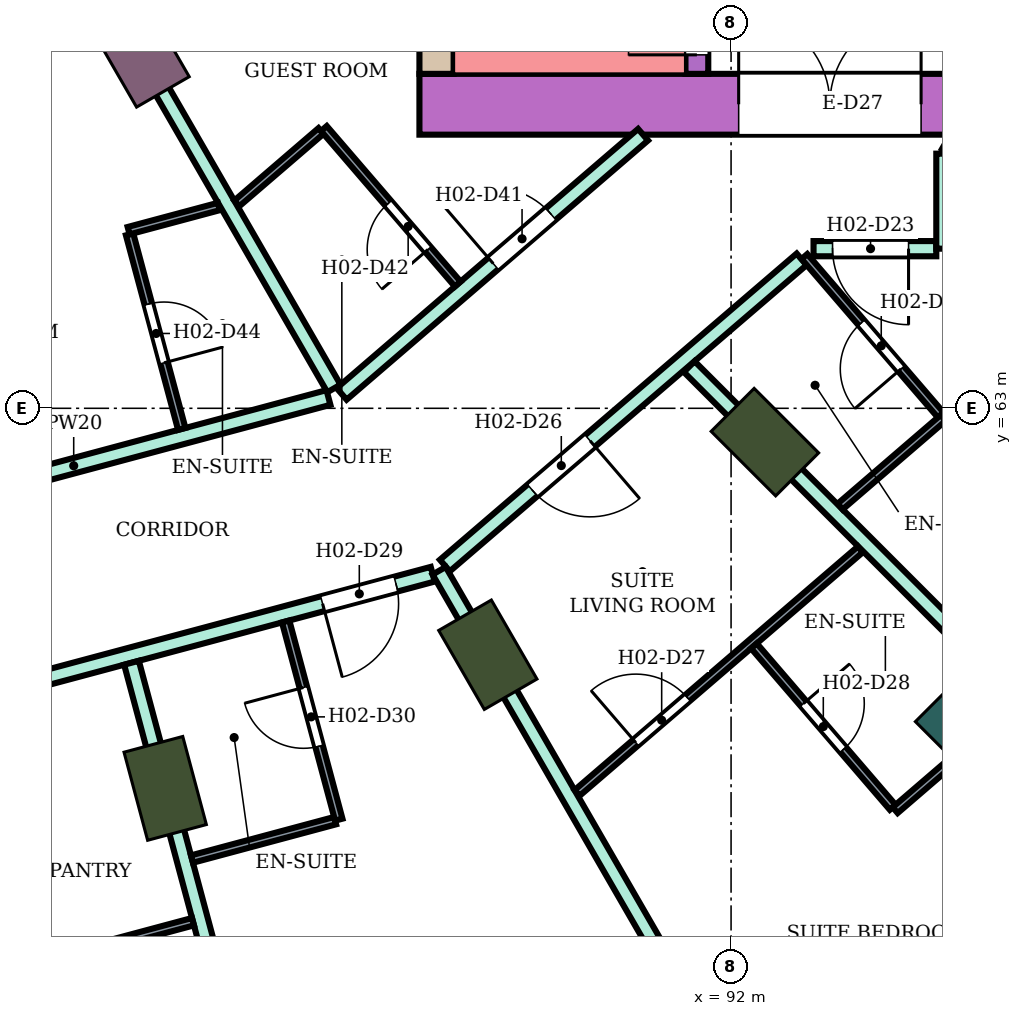
"""IFC4 building model, lengths in metres.
Left out: names, types, materials, properties, quantities, classifications, styles, units other than length and angle.
Written with IfcOpenShell. Run it as: python <this file> out.ifc"""

import sys

from ifc_helpers import new_model, si_unit, direction, frame, frame_2d, origin, origin_2d, place, context, subcontext, project, spatial, rectangle, extrude, element, fill, save


model = new_model("IFC4")
c1 = context("Model", 3, precision=1e-05, world=origin(), true_north=direction((0.0, 1.0)))
c2 = subcontext(c1, "Body", "Model", "MODEL_VIEW")
j1 = project(units=[si_unit("LENGTHUNIT", "METRE"), si_unit("PLANEANGLEUNIT", "RADIAN")], contexts=[c1])
p1 = place(None, origin())
s1 = spatial("IfcSite", under=j1, at=p1, CompositionType="ELEMENT")
p2 = place(p1, origin())
s2 = spatial("IfcBuilding", under=s1, at=p2, CompositionType="ELEMENT")
p3 = place(p2, frame((0.0, 0.0, 40.2)))
s3 = spatial("IfcBuildingStorey", under=s2, at=p3, CompositionType="ELEMENT", Elevation=40.2)
for number, where, z_axis, x_axis in (
    (1, (84.555, 58.0, 0.0), (0.0, 0.0, 1.0), (0.259, -0.966, 0.0)),
    (2, (88.8, 59.758, 0.0), (0.0, 0.0, 1.0), (0.5, -0.866, 0.0)),
    (3, (92.445, 62.555, 0.0), (0.0, 0.0, 1.0), (0.707, -0.707, 0.0)),
):
    element("IfcColumn", number, at=place(p3, frame(where, z_axis=z_axis, x_axis=x_axis)), inside=s3, PredefinedType="COLUMN", context=c2, shape_type="SweptSolid", body=[
        extrude(rectangle(XDim=1.2, YDim=0.8, at=origin_2d()), origin(), (0.0, 0.0, 1.0), 3.8),
    ])
p4 = place(p3, frame((84.3, 67.552, 0.0), z_axis=(0.0, 0.0, 1.0), x_axis=(0.5, -0.866025403784, 0.0)))
e4 = element("IfcColumn", 4, at=p4, inside=s3, PredefinedType="COLUMN", context=c2, shape_type="SweptSolid", body=[
    extrude(rectangle(XDim=0.9, YDim=0.8, at=origin_2d()), origin(), (0.0, 0.0, 1.0), 3.8),
])
p5 = place(p3, frame((95.91, 59.09, 0.0), z_axis=(0.0, 0.0, 1.0), x_axis=(0.707106781187, -0.707106781187, 0.0)))
e5 = element("IfcColumn", 5, at=p5, inside=s3, PredefinedType="COLUMN", context=c2, shape_type="SweptSolid", body=[
    extrude(rectangle(XDim=1.8, YDim=2.4, at=origin_2d()), origin(), (0.0, 0.0, 1.0), 3.8),
])
p6 = place(p3, frame((87.9, 67.0, 0.0), z_axis=(0.0, 0.0, 1.0), x_axis=(1.0, 0.0, 0.0)))
e6 = element("IfcWall", 6, at=p6, inside=s3, PredefinedType="SHEAR", context=c2, shape_type="SweptSolid", body=[
    extrude(rectangle(XDim=14.7, YDim=0.8, at=frame_2d((7.35, 0.0))), origin(), (0.0, 0.0, 1.0), 3.48),
])
p7 = place(p6, frame((4.2, 0.0, 0.0)))
e7 = element("IfcOpeningElement", 7, at=p7, cuts=e6, PredefinedType="OPENING", context=c2, shape_type="SweptSolid", body=[
    extrude(rectangle(XDim=2.4, YDim=2.4, at=frame_2d((1.2, 1.2))), frame((0.0, 0.41, 0.0), z_axis=(0.0, -1.0, 0.0), x_axis=(1.0, 0.0, 0.0)), (0.0, 0.0, 1.0), 0.82),
])
p8 = place(p3, frame((88.125, 67.4, 0.0), z_axis=(0.0, 0.0, 1.0), x_axis=(0.0, 1.0, 0.0)))
e8 = element("IfcWall", 8, at=p8, inside=s3, PredefinedType="SHEAR", context=c2, shape_type="SweptSolid", body=[
    extrude(rectangle(XDim=7.6, YDim=0.45, at=frame_2d((3.8, 0.0))), origin(), (0.0, 0.0, 1.0), 3.48),
])
p9 = place(p3, frame((91.55, 67.4, 0.0), z_axis=(0.0, 0.0, 1.0), x_axis=(0.0, 1.0, 0.0)))
e9 = element("IfcWall", 9, at=p9, inside=s3, PredefinedType="SHEAR", context=c2, shape_type="SweptSolid", body=[
    extrude(rectangle(XDim=7.6, YDim=0.3, at=frame_2d((3.8, 0.0))), origin(), (0.0, 0.0, 1.0), 3.48),
])
p10 = place(p9, frame((0.25, 0.0, 0.0)))
e10 = element("IfcOpeningElement", 10, at=p10, cuts=e9, PredefinedType="OPENING", context=c2, shape_type="SweptSolid", body=[
    extrude(rectangle(XDim=0.9, YDim=2.1, at=frame_2d((0.45, 1.05))), frame((0.0, 0.16, 0.0), z_axis=(0.0, -1.0, 0.0), x_axis=(1.0, 0.0, 0.0)), (0.0, 0.0, 1.0), 0.32),
])
p11 = place(p3, frame((80.0, 67.396, 0.0), z_axis=(0.0, 0.0, 1.0), x_axis=(0.965933654434, 0.258789828301, 0.0)))
e11 = element("IfcWall", 11, at=p11, inside=s3, PredefinedType="NOTDEFINED", context=c2, shape_type="SweptSolid", body=[
    extrude(rectangle(XDim=3.936, YDim=0.2, at=frame_2d((1.968, 0.0))), origin(), (0.0, 0.0, 1.0), 3.8),
])
p12 = place(p11, frame((0.468, 0.0, 0.9)))
e12 = element("IfcOpeningElement", 12, at=p12, cuts=e11, PredefinedType="OPENING", context=c2, shape_type="SweptSolid", body=[
    extrude(rectangle(XDim=3.0, YDim=2.3, at=frame_2d((1.5, 1.15))), frame((0.0, 0.11, 0.0), z_axis=(0.0, -1.0, 0.0), x_axis=(1.0, 0.0, 0.0)), (0.0, 0.0, 1.0), 0.22),
])
p13 = place(p3, frame((80.0, 58.655, 0.0), z_axis=(0.0, 0.0, 1.0), x_axis=(0.965967338894, 0.258664068224, 0.0)))
e13 = element("IfcWall", 13, at=p13, inside=s3, PredefinedType="PARTITIONING", context=c2, shape_type="SweptSolid", body=[
    extrude(rectangle(XDim=8.36, YDim=0.2, at=frame_2d((4.18, 0.0))), origin(), (0.0, 0.0, 1.0), 3.35),
])
p14 = place(p13, frame((6.86, 0.0, 0.0)))
e14 = element("IfcOpeningElement", 14, at=p14, cuts=e13, PredefinedType="OPENING", context=c2, shape_type="SweptSolid", body=[
    extrude(rectangle(XDim=1.0, YDim=2.1, at=frame_2d((0.5, 1.05))), frame((0.0, 0.11, 0.0), z_axis=(0.0, -1.0, 0.0), x_axis=(1.0, 0.0, 0.0)), (0.0, 0.0, 1.0), 0.22),
])
p15 = place(p13, frame((1.675, 0.0, 0.0)))
e15 = element("IfcOpeningElement", 15, at=p15, cuts=e13, PredefinedType="OPENING", context=c2, shape_type="SweptSolid", body=[
    extrude(rectangle(XDim=0.9, YDim=2.1, at=frame_2d((0.45, 1.05))), frame((0.0, 0.11, 0.0), z_axis=(0.0, -1.0, 0.0), x_axis=(1.0, 0.0, 0.0)), (0.0, 0.0, 1.0), 0.22),
])
p16 = place(p3, frame((80.0, 61.346, 0.0), z_axis=(0.0, 0.0, 1.0), x_axis=(0.965924181808, 0.258825182312, 0.0)))
e16 = element("IfcWall", 16, at=p16, inside=s3, PredefinedType="PARTITIONING", context=c2, shape_type="SweptSolid", body=[
    extrude(rectangle(XDim=6.94, YDim=0.2, at=frame_2d((3.47, 0.0))), origin(), (0.0, 0.0, 1.0), 3.35),
])
p17 = place(p16, frame((0.55, 0.0, 0.0)))
e17 = element("IfcOpeningElement", 17, at=p17, cuts=e16, PredefinedType="OPENING", context=c2, shape_type="SweptSolid", body=[
    extrude(rectangle(XDim=1.0, YDim=2.1, at=frame_2d((0.5, 1.05))), frame((0.0, 0.11, 0.0), z_axis=(0.0, -1.0, 0.0), x_axis=(1.0, 0.0, 0.0)), (0.0, 0.0, 1.0), 0.22),
])
p18 = place(p3, frame((83.848, 68.332, 0.0), z_axis=(0.0, 0.0, 1.0), x_axis=(0.499919778085, -0.866071714975, 0.0)))
e18 = element("IfcWall", 18, at=p18, inside=s3, PredefinedType="PARTITIONING", context=c2, shape_type="SweptSolid", body=[
    extrude(rectangle(XDim=5.855, YDim=0.2, at=frame_2d((2.927, 0.0))), origin(), (0.0, 0.0, 1.0), 3.35),
])
p19 = place(p3, frame((84.112, 59.652, 0.0), z_axis=(0.0, 0.0, 1.0), x_axis=(0.258791091927, -0.965933315886, 0.0)))
e19 = element("IfcWall", 19, at=p19, inside=s3, PredefinedType="PARTITIONING", context=c2, shape_type="SweptSolid", body=[
    extrude(rectangle(XDim=9.909, YDim=0.2, at=frame_2d((4.955, 0.0))), origin(), (0.0, 0.0, 1.0), 3.35),
])
p20 = place(p3, frame((86.877, 63.189, 0.0), z_axis=(0.0, 0.0, 1.0), x_axis=(0.758164888471, 0.652062881853, 0.0)))
e20 = element("IfcWall", 20, at=p20, inside=s3, PredefinedType="PARTITIONING", context=c2, shape_type="SweptSolid", body=[
    extrude(rectangle(XDim=5.23, YDim=0.2, at=frame_2d((2.615, 0.0))), origin(), (0.0, 0.0, 1.0), 3.35),
])
p21 = place(p20, frame((2.63, 0.0, 0.0)))
e21 = element("IfcOpeningElement", 21, at=p21, cuts=e20, PredefinedType="OPENING", context=c2, shape_type="SweptSolid", body=[
    extrude(rectangle(XDim=1.0, YDim=2.1, at=frame_2d((0.5, 1.05))), frame((0.0, 0.11, 0.0), z_axis=(0.0, -1.0, 0.0), x_axis=(1.0, 0.0, 0.0)), (0.0, 0.0, 1.0), 0.22),
])
p22 = place(p3, frame((88.235, 60.931, 0.0), z_axis=(0.0, 0.0, 1.0), x_axis=(0.758799498714, 0.651324282329, 0.0)))
e22 = element("IfcWall", 22, at=p22, inside=s3, PredefinedType="PARTITIONING", context=c2, shape_type="SweptSolid", body=[
    extrude(rectangle(XDim=6.186, YDim=0.2, at=frame_2d((3.093, 0.0))), origin(), (0.0, 0.0, 1.0), 3.35),
])
p23 = place(p22, frame((1.519, 0.0, 0.0)))
e23 = element("IfcOpeningElement", 23, at=p23, cuts=e22, PredefinedType="OPENING", context=c2, shape_type="SweptSolid", body=[
    extrude(rectangle(XDim=1.0, YDim=2.1, at=frame_2d((0.5, 1.05))), frame((0.0, 0.11, 0.0), z_axis=(0.0, -1.0, 0.0), x_axis=(1.0, 0.0, 0.0)), (0.0, 0.0, 1.0), 0.22),
])
p24 = place(p3, frame((88.159, 60.863, 0.0), z_axis=(0.0, 0.0, 1.0), x_axis=(0.499897184548, -0.866084756177, 0.0)))
e24 = element("IfcWall", 24, at=p24, inside=s3, PredefinedType="PARTITIONING", context=c2, shape_type="SweptSolid", body=[
    extrude(rectangle(XDim=9.475, YDim=0.2, at=frame_2d((4.737, 0.0))), origin(), (0.0, 0.0, 1.0), 3.35),
])
p25 = place(p3, frame((91.449, 63.548, 0.0), z_axis=(0.0, 0.0, 1.0), x_axis=(0.706984810649, -0.707228730688, 0.0)))
e25 = element("IfcWall", 25, at=p25, inside=s3, PredefinedType="PARTITIONING", context=c2, shape_type="SweptSolid", body=[
    extrude(rectangle(XDim=7.006, YDim=0.2, at=frame_2d((3.503, 0.0))), origin(), (0.0, 0.0, 1.0), 3.35),
])
p26 = place(p3, frame((93.085, 65.1, 0.0), z_axis=(0.0, 0.0, 1.0), x_axis=(1.0, 0.0, 0.0)))
e26 = element("IfcWall", 26, at=p26, inside=s3, PredefinedType="PARTITIONING", context=c2, shape_type="SweptSolid", body=[
    extrude(rectangle(XDim=1.615, YDim=0.2, at=frame_2d((0.808, 0.0))), origin(), (0.0, 0.0, 1.0), 3.35),
])
p27 = place(p26, frame((0.25, 0.0, 0.0)))
e27 = element("IfcOpeningElement", 27, at=p27, cuts=e26, PredefinedType="OPENING", context=c2, shape_type="SweptSolid", body=[
    extrude(rectangle(XDim=1.0, YDim=2.1, at=frame_2d((0.5, 1.05))), frame((0.0, 0.11, 0.0), z_axis=(0.0, -1.0, 0.0), x_axis=(1.0, 0.0, 0.0)), (0.0, 0.0, 1.0), 0.22),
])
p28 = place(p3, frame((94.8, 65.1, 0.0), z_axis=(0.0, 0.0, 1.0), x_axis=(0.0, 1.0, 0.0)))
e28 = element("IfcWall", 28, at=p28, inside=s3, PredefinedType="PARTITIONING", context=c2, shape_type="SweptSolid", body=[
    extrude(rectangle(XDim=1.25, YDim=0.2, at=frame_2d((0.625, 0.0))), origin(), (0.0, 0.0, 1.0), 3.35),
])
p29 = place(p3, frame((80.106, 54.956, 0.0), z_axis=(0.0, 0.0, 1.0), x_axis=(0.965910666284, 0.258875616386, 0.0)))
e29 = element("IfcWall", 29, at=p29, inside=s3, PredefinedType="PARTITIONING", context=c2, shape_type="SweptSolid", body=[
    extrude(rectangle(XDim=4.985, YDim=0.1, at=frame_2d((2.493, 0.0))), origin(), (0.0, 0.0, 1.0), 3.35),
])
p30 = place(p29, frame((2.038, 0.0, 0.0)))
e30 = element("IfcOpeningElement", 30, at=p30, cuts=e29, PredefinedType="OPENING", context=c2, shape_type="SweptSolid", body=[
    extrude(rectangle(XDim=0.9, YDim=2.1, at=frame_2d((0.45, 1.05))), frame((0.0, 0.06, 0.0), z_axis=(0.0, -1.0, 0.0), x_axis=(1.0, 0.0, 0.0)), (0.0, 0.0, 1.0), 0.12),
])
p31 = place(p3, frame((84.087, 65.289, 0.0), z_axis=(0.0, 0.0, 1.0), x_axis=(0.258929459649, -0.965896234037, 0.0)))
e31 = element("IfcWall", 31, at=p31, inside=s3, PredefinedType="PARTITIONING", context=c2, shape_type="SweptSolid", body=[
    extrude(rectangle(XDim=2.65, YDim=0.1, at=frame_2d((1.325, 0.0))), origin(), (0.0, 0.0, 1.0), 3.35),
])
p32 = place(p31, frame((0.95, 0.0, 0.0)))
e32 = element("IfcOpeningElement", 32, at=p32, cuts=e31, PredefinedType="OPENING", context=c2, shape_type="SweptSolid", body=[
    extrude(rectangle(XDim=0.8, YDim=2.1, at=frame_2d((0.4, 1.05))), frame((0.0, 0.06, 0.0), z_axis=(0.0, -1.0, 0.0), x_axis=(1.0, 0.0, 0.0)), (0.0, 0.0, 1.0), 0.12),
])
p33 = place(p3, frame((84.074, 65.337, 0.0), z_axis=(0.0, 0.0, 1.0), x_axis=(0.965914351064, 0.258861867428, 0.0)))
e33 = element("IfcWall", 33, at=p33, inside=s3, PredefinedType="PARTITIONING", context=c2, shape_type="SweptSolid", body=[
    extrude(rectangle(XDim=1.229, YDim=0.1, at=frame_2d((0.615, 0.0))), origin(), (0.0, 0.0, 1.0), 3.35),
])
p34 = place(p3, frame((84.908, 57.07, 0.0), z_axis=(0.0, 0.0, 1.0), x_axis=(0.965853538138, 0.25908867761, 0.0)))
e34 = element("IfcWall", 34, at=p34, inside=s3, PredefinedType="PARTITIONING", context=c2, shape_type="SweptSolid", body=[
    extrude(rectangle(XDim=1.95, YDim=0.1, at=frame_2d((0.975, 0.0))), origin(), (0.0, 0.0, 1.0), 3.35),
])
p35 = place(p3, frame((85.497, 65.696, 0.0), z_axis=(0.0, 0.0, 1.0), x_axis=(0.75817032582, 0.652056559698, 0.0)))
e35 = element("IfcWall", 35, at=p35, inside=s3, PredefinedType="PARTITIONING", context=c2, shape_type="SweptSolid", body=[
    extrude(rectangle(XDim=1.461, YDim=0.1, at=frame_2d((0.73, 0.0))), origin(), (0.0, 0.0, 1.0), 3.35),
])
p36 = place(p3, frame((86.14, 60.196, 0.0), z_axis=(0.0, 0.0, 1.0), x_axis=(0.258945475746, -0.965891940432, 0.0)))
e36 = element("IfcWall", 36, at=p36, inside=s3, PredefinedType="PARTITIONING", context=c2, shape_type="SweptSolid", body=[
    extrude(rectangle(XDim=2.7, YDim=0.1, at=frame_2d((1.35, 0.0))), origin(), (0.0, 0.0, 1.0), 3.35),
])
p37 = place(p36, frame((0.9, 0.0, 0.0)))
e37 = element("IfcOpeningElement", 37, at=p37, cuts=e36, PredefinedType="OPENING", context=c2, shape_type="SweptSolid", body=[
    extrude(rectangle(XDim=0.8, YDim=2.1, at=frame_2d((0.4, 1.05))), frame((0.0, 0.06, 0.0), z_axis=(0.0, -1.0, 0.0), x_axis=(1.0, 0.0, 0.0)), (0.0, 0.0, 1.0), 0.12),
])
p38 = place(p3, frame((86.643, 66.681, 0.0), z_axis=(0.0, 0.0, 1.0), x_axis=(0.652264876065, -0.757991115682, 0.0)))
e38 = element("IfcWall", 38, at=p38, inside=s3, PredefinedType="PARTITIONING", context=c2, shape_type="SweptSolid", body=[
    extrude(rectangle(XDim=2.699, YDim=0.1, at=frame_2d((1.35, 0.0))), origin(), (0.0, 0.0, 1.0), 3.35),
])
p39 = place(p38, frame((1.3, 0.0, 0.0)))
e39 = element("IfcOpeningElement", 39, at=p39, cuts=e38, PredefinedType="OPENING", context=c2, shape_type="SweptSolid", body=[
    extrude(rectangle(XDim=0.8, YDim=2.1, at=frame_2d((0.4, 1.05))), frame((0.0, 0.06, 0.0), z_axis=(0.0, -1.0, 0.0), x_axis=(1.0, 0.0, 0.0)), (0.0, 0.0, 1.0), 0.12),
])
p40 = place(p3, frame((89.974, 57.94, 0.0), z_axis=(0.0, 0.0, 1.0), x_axis=(0.75821417454, 0.652005571699, 0.0)))
e40 = element("IfcWall", 40, at=p40, inside=s3, PredefinedType="PARTITIONING", context=c2, shape_type="SweptSolid", body=[
    extrude(rectangle(XDim=4.915, YDim=0.1, at=frame_2d((2.457, 0.0))), origin(), (0.0, 0.0, 1.0), 3.35),
])
p41 = place(p40, frame((1.017, 0.0, 0.0)))
e41 = element("IfcOpeningElement", 41, at=p41, cuts=e40, PredefinedType="OPENING", context=c2, shape_type="SweptSolid", body=[
    extrude(rectangle(XDim=0.9, YDim=2.1, at=frame_2d((0.45, 1.05))), frame((0.0, 0.06, 0.0), z_axis=(0.0, -1.0, 0.0), x_axis=(1.0, 0.0, 0.0)), (0.0, 0.0, 1.0), 0.12),
])
p42 = place(p3, frame((92.301, 59.874, 0.0), z_axis=(0.0, 0.0, 1.0), x_axis=(0.652061320562, -0.758166231262, 0.0)))
e42 = element("IfcWall", 42, at=p42, inside=s3, PredefinedType="PARTITIONING", context=c2, shape_type="SweptSolid", body=[
    extrude(rectangle(XDim=2.8, YDim=0.1, at=frame_2d((1.4, 0.0))), origin(), (0.0, 0.0, 1.0), 3.35),
])
p43 = place(p42, frame((1.0, 0.0, 0.0)))
e43 = element("IfcOpeningElement", 43, at=p43, cuts=e42, PredefinedType="OPENING", context=c2, shape_type="SweptSolid", body=[
    extrude(rectangle(XDim=0.8, YDim=2.1, at=frame_2d((0.4, 1.05))), frame((0.0, 0.06, 0.0), z_axis=(0.0, -1.0, 0.0), x_axis=(1.0, 0.0, 0.0)), (0.0, 0.0, 1.0), 0.12),
])
p44 = place(p3, frame((92.965, 64.997, 0.0), z_axis=(0.0, 0.0, 1.0), x_axis=(0.652069888227, -0.758158862553, 0.0)))
e44 = element("IfcWall", 44, at=p44, inside=s3, PredefinedType="PARTITIONING", context=c2, shape_type="SweptSolid", body=[
    extrude(rectangle(XDim=2.75, YDim=0.1, at=frame_2d((1.375, 0.0))), origin(), (0.0, 0.0, 1.0), 3.35),
])
p45 = place(p44, frame((1.15, 0.0, 0.0)))
e45 = element("IfcOpeningElement", 45, at=p45, cuts=e44, PredefinedType="OPENING", context=c2, shape_type="SweptSolid", body=[
    extrude(rectangle(XDim=0.8, YDim=2.1, at=frame_2d((0.4, 1.05))), frame((0.0, 0.06, 0.0), z_axis=(0.0, -1.0, 0.0), x_axis=(1.0, 0.0, 0.0)), (0.0, 0.0, 1.0), 0.12),
])
p46 = place(p3, frame((93.435, 61.707, 0.0), z_axis=(0.0, 0.0, 1.0), x_axis=(0.758070495124, 0.652172618578, 0.0)))
e46 = element("IfcWall", 46, at=p46, inside=s3, PredefinedType="PARTITIONING", context=c2, shape_type="SweptSolid", body=[
    extrude(rectangle(XDim=1.789, YDim=0.1, at=frame_2d((0.895, 0.0))), origin(), (0.0, 0.0, 1.0), 3.35),
])
p47 = place(p3, frame((94.159, 57.713, 0.0), z_axis=(0.0, 0.0, 1.0), x_axis=(0.75802950812, 0.652220257903, 0.0)))
e47 = element("IfcWall", 47, at=p47, inside=s3, PredefinedType="PARTITIONING", context=c2, shape_type="SweptSolid", body=[
    extrude(rectangle(XDim=2.109, YDim=0.1, at=frame_2d((1.054, 0.0))), origin(), (0.0, 0.0, 1.0), 3.35),
])
p48 = place(p3, frame((94.8, 66.455, 0.0), z_axis=(0.0, 0.0, 1.0), x_axis=(0.86602264145, -0.500004784474, 0.0)))
e48 = element("IfcWall", 48, at=p48, inside=s3, PredefinedType="PARTITIONING", context=c2, shape_type="SweptSolid", body=[
    extrude(rectangle(XDim=8.708, YDim=0.1, at=frame_2d((4.354, 0.0))), origin(), (0.0, 0.0, 1.0), 3.35),
])
p49 = place(p48, frame((3.879, 0.0, 0.0)))
e49 = element("IfcOpeningElement", 49, at=p49, cuts=e48, PredefinedType="OPENING", context=c2, shape_type="SweptSolid", body=[
    extrude(rectangle(XDim=0.9, YDim=2.1, at=frame_2d((0.45, 1.05))), frame((0.0, 0.06, 0.0), z_axis=(0.0, -1.0, 0.0), x_axis=(1.0, 0.0, 0.0)), (0.0, 0.0, 1.0), 0.12),
])
p50 = place(p12, origin())
e50 = element("IfcWindow", 50, at=p50, inside=s3, PartitioningType="SINGLE_PANEL", PredefinedType="WINDOW", context=c2, shape_type="SweptSolid", body=[
    extrude(rectangle(XDim=3.0, YDim=2.3, at=frame_2d((1.5, 1.15))), frame((0.0, 0.03, 0.0), z_axis=(0.0, -1.0, 0.0), x_axis=(1.0, 0.0, 0.0)), (0.0, 0.0, 1.0), 0.06),
])
fill(e12, e50)
p51 = place(p27, frame((1.0, 0.0, 0.0), z_axis=(0.0, 0.0, 1.0), x_axis=(-1.0, 0.0, 0.0)))
e51 = element("IfcDoor", 51, at=p51, inside=s3, OperationType="SINGLE_SWING_LEFT", PredefinedType="DOOR", context=c2, shape_type="SweptSolid", body=[
    extrude(rectangle(XDim=1.0, YDim=2.1, at=frame_2d((0.5, 1.05))), frame((0.0, 0.025, 0.0), z_axis=(0.0, -1.0, 0.0), x_axis=(1.0, 0.0, 0.0)), (0.0, 0.0, 1.0), 0.05),
])
fill(e27, e51)
p52 = place(p45, frame((0.8, 0.0, 0.0), z_axis=(0.0, 0.0, 1.0), x_axis=(-1.0, 0.0, 0.0)))
e52 = element("IfcDoor", 52, at=p52, inside=s3, OperationType="SINGLE_SWING_LEFT", PredefinedType="DOOR", context=c2, shape_type="SweptSolid", body=[
    extrude(rectangle(XDim=0.8, YDim=2.1, at=frame_2d((0.4, 1.05))), frame((0.0, 0.025, 0.0), z_axis=(0.0, -1.0, 0.0), x_axis=(1.0, 0.0, 0.0)), (0.0, 0.0, 1.0), 0.05),
])
fill(e45, e52)
p53 = place(p23, frame((1.0, 0.0, 0.0), z_axis=(0.0, 0.0, 1.0), x_axis=(-1.0, 0.0, 0.0)))
e53 = element("IfcDoor", 53, at=p53, inside=s3, OperationType="SINGLE_SWING_LEFT", PredefinedType="DOOR", context=c2, shape_type="SweptSolid", body=[
    extrude(rectangle(XDim=1.0, YDim=2.1, at=frame_2d((0.5, 1.05))), frame((0.0, 0.025, 0.0), z_axis=(0.0, -1.0, 0.0), x_axis=(1.0, 0.0, 0.0)), (0.0, 0.0, 1.0), 0.05),
])
fill(e23, e53)
p54 = place(p41, origin())
e54 = element("IfcDoor", 54, at=p54, inside=s3, OperationType="SINGLE_SWING_LEFT", PredefinedType="DOOR", context=c2, shape_type="SweptSolid", body=[
    extrude(rectangle(XDim=0.9, YDim=2.1, at=frame_2d((0.45, 1.05))), frame((0.0, 0.025, 0.0), z_axis=(0.0, -1.0, 0.0), x_axis=(1.0, 0.0, 0.0)), (0.0, 0.0, 1.0), 0.05),
])
fill(e41, e54)
p55 = place(p43, origin())
e55 = element("IfcDoor", 55, at=p55, inside=s3, OperationType="SINGLE_SWING_LEFT", PredefinedType="DOOR", context=c2, shape_type="SweptSolid", body=[
    extrude(rectangle(XDim=0.8, YDim=2.1, at=frame_2d((0.4, 1.05))), frame((0.0, 0.025, 0.0), z_axis=(0.0, -1.0, 0.0), x_axis=(1.0, 0.0, 0.0)), (0.0, 0.0, 1.0), 0.05),
])
fill(e43, e55)
p56 = place(p14, frame((1.0, 0.0, 0.0), z_axis=(0.0, 0.0, 1.0), x_axis=(-1.0, 0.0, 0.0)))
e56 = element("IfcDoor", 56, at=p56, inside=s3, OperationType="SINGLE_SWING_RIGHT", PredefinedType="DOOR", context=c2, shape_type="SweptSolid", body=[
    extrude(rectangle(XDim=1.0, YDim=2.1, at=frame_2d((0.5, 1.05))), frame((0.0, 0.025, 0.0), z_axis=(0.0, -1.0, 0.0), x_axis=(1.0, 0.0, 0.0)), (0.0, 0.0, 1.0), 0.05),
])
fill(e14, e56)
p57 = place(p37, frame((0.8, 0.0, 0.0), z_axis=(0.0, 0.0, 1.0), x_axis=(-1.0, 0.0, 0.0)))
e57 = element("IfcDoor", 57, at=p57, inside=s3, OperationType="SINGLE_SWING_RIGHT", PredefinedType="DOOR", context=c2, shape_type="SweptSolid", body=[
    extrude(rectangle(XDim=0.8, YDim=2.1, at=frame_2d((0.4, 1.05))), frame((0.0, 0.025, 0.0), z_axis=(0.0, -1.0, 0.0), x_axis=(1.0, 0.0, 0.0)), (0.0, 0.0, 1.0), 0.05),
])
fill(e37, e57)
p58 = place(p21, origin())
e58 = element("IfcDoor", 58, at=p58, inside=s3, OperationType="SINGLE_SWING_LEFT", PredefinedType="DOOR", context=c2, shape_type="SweptSolid", body=[
    extrude(rectangle(XDim=1.0, YDim=2.1, at=frame_2d((0.5, 1.05))), frame((0.0, 0.025, 0.0), z_axis=(0.0, -1.0, 0.0), x_axis=(1.0, 0.0, 0.0)), (0.0, 0.0, 1.0), 0.05),
])
fill(e21, e58)
p59 = place(p39, frame((0.8, 0.0, 0.0), z_axis=(0.0, 0.0, 1.0), x_axis=(-1.0, 0.0, 0.0)))
e59 = element("IfcDoor", 59, at=p59, inside=s3, OperationType="SINGLE_SWING_LEFT", PredefinedType="DOOR", context=c2, shape_type="SweptSolid", body=[
    extrude(rectangle(XDim=0.8, YDim=2.1, at=frame_2d((0.4, 1.05))), frame((0.0, 0.025, 0.0), z_axis=(0.0, -1.0, 0.0), x_axis=(1.0, 0.0, 0.0)), (0.0, 0.0, 1.0), 0.05),
])
fill(e39, e59)
p60 = place(p32, origin())
e60 = element("IfcDoor", 60, at=p60, inside=s3, OperationType="SINGLE_SWING_RIGHT", PredefinedType="DOOR", context=c2, shape_type="SweptSolid", body=[
    extrude(rectangle(XDim=0.8, YDim=2.1, at=frame_2d((0.4, 1.05))), frame((0.0, 0.025, 0.0), z_axis=(0.0, -1.0, 0.0), x_axis=(1.0, 0.0, 0.0)), (0.0, 0.0, 1.0), 0.05),
])
fill(e32, e60)
p61 = place(p10, origin())
e61 = element("IfcDoor", 61, at=p61, inside=s3, OperationType="SINGLE_SWING_LEFT", PredefinedType="DOOR", context=c2, shape_type="SweptSolid", body=[
    extrude(rectangle(XDim=0.9, YDim=2.1, at=frame_2d((0.45, 1.05))), frame((0.0, 0.025, 0.0), z_axis=(0.0, -1.0, 0.0), x_axis=(1.0, 0.0, 0.0)), (0.0, 0.0, 1.0), 0.05),
])
fill(e10, e61)
p62 = place(p7, origin())
e62 = element("IfcDoor", 62, at=p62, inside=s3, OperationType="DOUBLE_DOOR_SINGLE_SWING", PredefinedType="DOOR", context=c2, shape_type="SweptSolid", body=[
    extrude(rectangle(XDim=2.4, YDim=2.4, at=frame_2d((1.2, 1.2))), frame((0.0, 0.025, 0.0), z_axis=(0.0, -1.0, 0.0), x_axis=(1.0, 0.0, 0.0)), (0.0, 0.0, 1.0), 0.05),
])
fill(e7, e62)
save(model, sys.argv[1])
